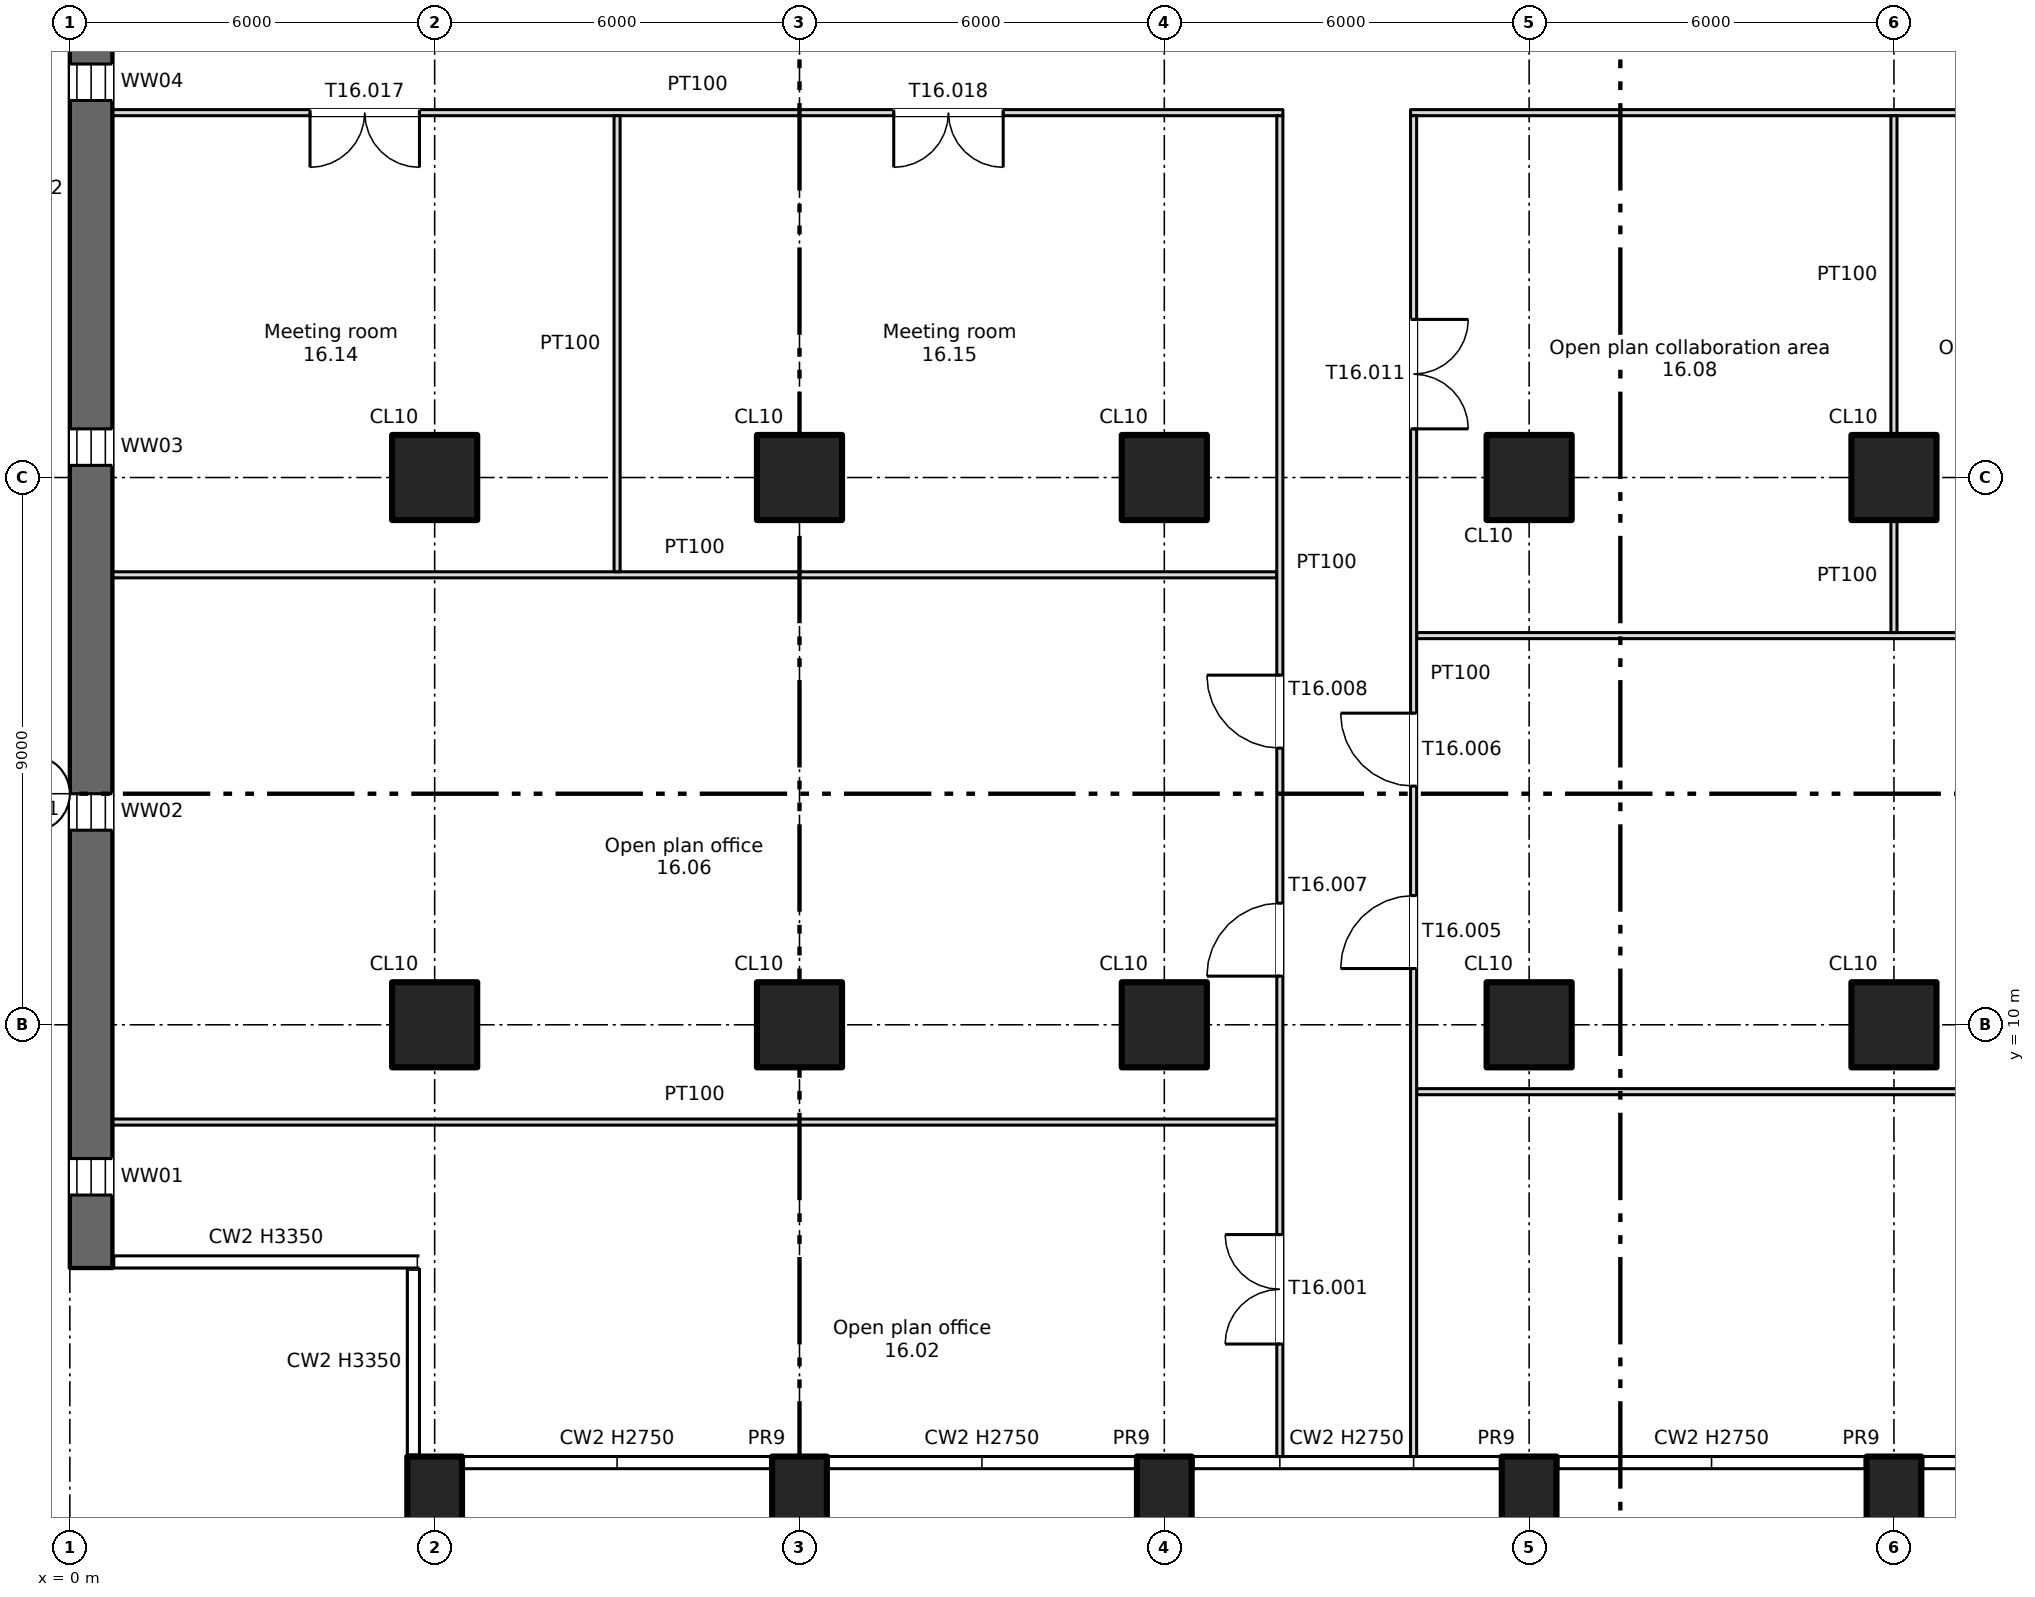
"""IFC4 building model, lengths in metres.
Left out: names, types, materials, properties, quantities, classifications, styles, units other than length and angle.
Written with IfcOpenShell. Run it as: python <this file> out.ifc"""

import sys

from ifc_helpers import new_model, si_unit, direction, frame, frame_2d, origin, origin_2d, place, context, subcontext, project, spatial, rectangle, extrude, element, fill, save


model = new_model("IFC4")
c1 = context("Model", 3, precision=1e-05, world=origin(), true_north=direction((0.0, 1.0)))
c2 = subcontext(c1, "Body", "Model", "MODEL_VIEW")
j1 = project(units=[si_unit("LENGTHUNIT", "METRE"), si_unit("PLANEANGLEUNIT", "RADIAN")], contexts=[c1])
p1 = place(None, origin())
s1 = spatial("IfcSite", under=j1, at=p1, CompositionType="ELEMENT")
p2 = place(p1, origin())
s2 = spatial("IfcBuilding", under=s1, at=p2, CompositionType="ELEMENT")
p3 = place(p2, frame((0.0, 0.0, 102.5)))
s3 = spatial("IfcBuildingStorey", under=s2, at=p3, CompositionType="ELEMENT", Elevation=102.5)
for number, where, z_axis, x_axis in (
    (1, (6.0, 2.2, -0.4), (0.0, 0.0, 1.0), (1.0, 0.0, 0.0)),
    (2, (12.0, 2.2, -0.4), (0.0, 0.0, 1.0), (1.0, 0.0, 0.0)),
    (3, (18.0, 2.2, -0.4), (0.0, 0.0, 1.0), (1.0, 0.0, 0.0)),
    (4, (24.0, 2.2, -0.4), (0.0, 0.0, 1.0), (1.0, 0.0, 0.0)),
    (5, (30.0, 2.2, -0.4), (0.0, 0.0, 1.0), (1.0, 0.0, 0.0)),
):
    element("IfcColumn", number, at=place(p3, frame(where, z_axis=z_axis, x_axis=x_axis)), inside=s3, PredefinedType="COLUMN", context=c2, shape_type="SweptSolid", body=[
        extrude(rectangle(XDim=0.9, YDim=1.4, at=origin_2d()), origin(), (0.0, 0.0, 1.0), 3.75),
    ])
for number, where, z_axis, x_axis in (
    (6, (6.0, 10.0, 0.0), (0.0, 0.0, 1.0), (1.0, 0.0, 0.0)),
    (7, (6.0, 19.0, 0.0), (0.0, 0.0, 1.0), (1.0, 0.0, 0.0)),
    (8, (12.0, 10.0, 0.0), (0.0, 0.0, 1.0), (1.0, 0.0, 0.0)),
    (9, (12.0, 19.0, 0.0), (0.0, 0.0, 1.0), (1.0, 0.0, 0.0)),
    (10, (18.0, 10.0, 0.0), (0.0, 0.0, 1.0), (1.0, 0.0, 0.0)),
    (11, (18.0, 19.0, 0.0), (0.0, 0.0, 1.0), (1.0, 0.0, 0.0)),
    (12, (24.0, 10.0, 0.0), (0.0, 0.0, 1.0), (1.0, 0.0, 0.0)),
    (13, (24.0, 19.0, 0.0), (0.0, 0.0, 1.0), (1.0, 0.0, 0.0)),
    (14, (30.0, 10.0, 0.0), (0.0, 0.0, 1.0), (1.0, 0.0, 0.0)),
    (15, (30.0, 19.0, 0.0), (0.0, 0.0, 1.0), (1.0, 0.0, 0.0)),
):
    element("IfcColumn", number, at=place(p3, frame(where, z_axis=z_axis, x_axis=x_axis)), inside=s3, PredefinedType="COLUMN", context=c2, shape_type="SweptSolid", body=[
        extrude(rectangle(XDim=1.4, YDim=1.4, at=origin_2d()), origin(), (0.0, 0.0, 1.0), 3.35),
    ])
p4 = place(p3, frame((0.35, 6.0, 0.0), z_axis=(0.0, 0.0, 1.0), x_axis=(0.0, 1.0, 0.0)))
e16 = element("IfcWall", 16, at=p4, inside=s3, PredefinedType="SHEAR", context=c2, shape_type="SweptSolid", body=[
    extrude(rectangle(XDim=35.5, YDim=0.7, at=frame_2d((17.75, 0.0))), origin(), (0.0, 0.0, 1.0), 3.35),
])
p5 = place(p4, frame((1.2, 0.0, 0.6)))
e17 = element("IfcOpeningElement", 17, at=p5, cuts=e16, PredefinedType="OPENING", context=c2, shape_type="SweptSolid", body=[
    extrude(rectangle(XDim=0.6, YDim=2.4, at=frame_2d((0.3, 1.2))), frame((0.0, 0.36, 0.0), z_axis=(0.0, -1.0, 0.0), x_axis=(1.0, 0.0, 0.0)), (0.0, 0.0, 1.0), 0.72),
])
p6 = place(p4, frame((7.2, 0.0, 0.6)))
e18 = element("IfcOpeningElement", 18, at=p6, cuts=e16, PredefinedType="OPENING", context=c2, shape_type="SweptSolid", body=[
    extrude(rectangle(XDim=0.6, YDim=2.4, at=frame_2d((0.3, 1.2))), frame((0.0, 0.36, 0.0), z_axis=(0.0, -1.0, 0.0), x_axis=(1.0, 0.0, 0.0)), (0.0, 0.0, 1.0), 0.72),
])
p7 = place(p4, frame((13.2, 0.0, 0.6)))
e19 = element("IfcOpeningElement", 19, at=p7, cuts=e16, PredefinedType="OPENING", context=c2, shape_type="SweptSolid", body=[
    extrude(rectangle(XDim=0.6, YDim=2.4, at=frame_2d((0.3, 1.2))), frame((0.0, 0.36, 0.0), z_axis=(0.0, -1.0, 0.0), x_axis=(1.0, 0.0, 0.0)), (0.0, 0.0, 1.0), 0.72),
])
p8 = place(p4, frame((19.2, 0.0, 0.6)))
e20 = element("IfcOpeningElement", 20, at=p8, cuts=e16, PredefinedType="OPENING", context=c2, shape_type="SweptSolid", body=[
    extrude(rectangle(XDim=0.6, YDim=2.4, at=frame_2d((0.3, 1.2))), frame((0.0, 0.36, 0.0), z_axis=(0.0, -1.0, 0.0), x_axis=(1.0, 0.0, 0.0)), (0.0, 0.0, 1.0), 0.72),
])
p9 = place(p4, frame((25.2, 0.0, 0.6)))
e21 = element("IfcOpeningElement", 21, at=p9, cuts=e16, PredefinedType="OPENING", context=c2, shape_type="SweptSolid", body=[
    extrude(rectangle(XDim=0.6, YDim=2.4, at=frame_2d((0.3, 1.2))), frame((0.0, 0.36, 0.0), z_axis=(0.0, -1.0, 0.0), x_axis=(1.0, 0.0, 0.0)), (0.0, 0.0, 1.0), 0.72),
])
p10 = place(p4, frame((31.2, 0.0, 0.6)))
e22 = element("IfcOpeningElement", 22, at=p10, cuts=e16, PredefinedType="OPENING", context=c2, shape_type="SweptSolid", body=[
    extrude(rectangle(XDim=0.6, YDim=2.4, at=frame_2d((0.3, 1.2))), frame((0.0, 0.36, 0.0), z_axis=(0.0, -1.0, 0.0), x_axis=(1.0, 0.0, 0.0)), (0.0, 0.0, 1.0), 0.72),
])
p11 = place(p3, frame((0.7, 8.4, 0.0), z_axis=(0.0, 0.0, 1.0), x_axis=(1.0, 0.0, 0.0)))
e23 = element("IfcWall", 23, at=p11, inside=s3, PredefinedType="PARTITIONING", context=c2, shape_type="SweptSolid", body=[
    extrude(rectangle(XDim=19.15, YDim=0.1, at=frame_2d((9.575, 0.0))), origin(), (0.0, 0.0, 1.0), 3.35),
])
for number, where, z_axis, x_axis in (
    (24, (22.15, 8.9, 0.0), (0.0, 0.0, 1.0), (1.0, 0.0, 0.0)),
    (25, (22.15, 16.4, 0.0), (0.0, 0.0, 1.0), (1.0, 0.0, 0.0)),
):
    element("IfcWall", number, at=place(p3, frame(where, z_axis=z_axis, x_axis=x_axis)), inside=s3, PredefinedType="PARTITIONING", context=c2, shape_type="SweptSolid", body=[
        extrude(rectangle(XDim=21.7, YDim=0.1, at=frame_2d((10.85, 0.0))), origin(), (0.0, 0.0, 1.0), 3.35),
    ])
p12 = place(p3, frame((0.7, 17.4, 0.0), z_axis=(0.0, 0.0, 1.0), x_axis=(1.0, 0.0, 0.0)))
e26 = element("IfcWall", 26, at=p12, inside=s3, PredefinedType="PARTITIONING", context=c2, shape_type="SweptSolid", body=[
    extrude(rectangle(XDim=19.15, YDim=0.1, at=frame_2d((9.575, 0.0))), origin(), (0.0, 0.0, 1.0), 3.35),
])
p13 = place(p3, frame((0.7, 25.0, 0.0), z_axis=(0.0, 0.0, 1.0), x_axis=(1.0, 0.0, 0.0)))
e27 = element("IfcWall", 27, at=p13, inside=s3, PredefinedType="PARTITIONING", context=c2, shape_type="SweptSolid", body=[
    extrude(rectangle(XDim=19.25, YDim=0.1, at=frame_2d((9.625, 0.0))), origin(), (0.0, 0.0, 1.0), 3.35),
])
p14 = place(p13, frame((3.25, 0.0, 0.0)))
e28 = element("IfcOpeningElement", 28, at=p14, cuts=e27, PredefinedType="OPENING", context=c2, shape_type="SweptSolid", body=[
    extrude(rectangle(XDim=1.8, YDim=2.1, at=frame_2d((0.9, 1.05))), frame((0.0, 0.06, 0.0), z_axis=(0.0, -1.0, 0.0), x_axis=(1.0, 0.0, 0.0)), (0.0, 0.0, 1.0), 0.12),
])
p15 = place(p13, frame((12.85, 0.0, 0.0)))
e29 = element("IfcOpeningElement", 29, at=p15, cuts=e27, PredefinedType="OPENING", context=c2, shape_type="SweptSolid", body=[
    extrude(rectangle(XDim=1.8, YDim=2.1, at=frame_2d((0.9, 1.05))), frame((0.0, 0.06, 0.0), z_axis=(0.0, -1.0, 0.0), x_axis=(1.0, 0.0, 0.0)), (0.0, 0.0, 1.0), 0.12),
])
p16 = place(p3, frame((22.05, 25.0, 0.0), z_axis=(0.0, 0.0, 1.0), x_axis=(1.0, 0.0, 0.0)))
e30 = element("IfcWall", 30, at=p16, inside=s3, PredefinedType="PARTITIONING", context=c2, shape_type="SweptSolid", body=[
    extrude(rectangle(XDim=21.9, YDim=0.1, at=frame_2d((10.95, 0.0))), origin(), (0.0, 0.0, 1.0), 3.35),
])
p17 = place(p16, frame((10.45, 0.0, 0.0)))
e31 = element("IfcOpeningElement", 31, at=p17, cuts=e30, PredefinedType="OPENING", context=c2, shape_type="SweptSolid", body=[
    extrude(rectangle(XDim=1.0, YDim=2.1, at=frame_2d((0.5, 1.05))), frame((0.0, 0.06, 0.0), z_axis=(0.0, -1.0, 0.0), x_axis=(1.0, 0.0, 0.0)), (0.0, 0.0, 1.0), 0.12),
])
p18 = place(p3, frame((9.0, 17.45, 0.0), z_axis=(0.0, 0.0, 1.0), x_axis=(0.0, 1.0, 0.0)))
e32 = element("IfcWall", 32, at=p18, inside=s3, PredefinedType="PARTITIONING", context=c2, shape_type="SweptSolid", body=[
    extrude(rectangle(XDim=7.5, YDim=0.1, at=frame_2d((3.75, 0.0))), origin(), (0.0, 0.0, 1.0), 3.35),
])
p19 = place(p3, frame((19.9, 2.9, 0.0), z_axis=(0.0, 0.0, 1.0), x_axis=(0.0, 1.0, 0.0)))
e33 = element("IfcWall", 33, at=p19, inside=s3, PredefinedType="PARTITIONING", context=c2, shape_type="SweptSolid", body=[
    extrude(rectangle(XDim=22.05, YDim=0.1, at=frame_2d((11.025, 0.0))), origin(), (0.0, 0.0, 1.0), 3.35),
])
p20 = place(p19, frame((1.85, 0.0, 0.0)))
e34 = element("IfcOpeningElement", 34, at=p20, cuts=e33, PredefinedType="OPENING", context=c2, shape_type="SweptSolid", body=[
    extrude(rectangle(XDim=1.8, YDim=2.1, at=frame_2d((0.9, 1.05))), frame((0.0, 0.06, 0.0), z_axis=(0.0, -1.0, 0.0), x_axis=(1.0, 0.0, 0.0)), (0.0, 0.0, 1.0), 0.12),
])
p21 = place(p19, frame((7.9, 0.0, 0.0)))
e35 = element("IfcOpeningElement", 35, at=p21, cuts=e33, PredefinedType="OPENING", context=c2, shape_type="SweptSolid", body=[
    extrude(rectangle(XDim=1.2, YDim=2.1, at=frame_2d((0.6, 1.05))), frame((0.0, 0.06, 0.0), z_axis=(0.0, -1.0, 0.0), x_axis=(1.0, 0.0, 0.0)), (0.0, 0.0, 1.0), 0.12),
])
p22 = place(p19, frame((11.65, 0.0, 0.0)))
e36 = element("IfcOpeningElement", 36, at=p22, cuts=e33, PredefinedType="OPENING", context=c2, shape_type="SweptSolid", body=[
    extrude(rectangle(XDim=1.2, YDim=2.1, at=frame_2d((0.6, 1.05))), frame((0.0, 0.06, 0.0), z_axis=(0.0, -1.0, 0.0), x_axis=(1.0, 0.0, 0.0)), (0.0, 0.0, 1.0), 0.12),
])
p23 = place(p3, frame((22.1, 2.9, 0.0), z_axis=(0.0, 0.0, 1.0), x_axis=(0.0, 1.0, 0.0)))
e37 = element("IfcWall", 37, at=p23, inside=s3, PredefinedType="PARTITIONING", context=c2, shape_type="SweptSolid", body=[
    extrude(rectangle(XDim=22.05, YDim=0.1, at=frame_2d((11.025, 0.0))), origin(), (0.0, 0.0, 1.0), 3.35),
])
p24 = place(p23, frame((8.025, 0.0, 0.0)))
e38 = element("IfcOpeningElement", 38, at=p24, cuts=e37, PredefinedType="OPENING", context=c2, shape_type="SweptSolid", body=[
    extrude(rectangle(XDim=1.2, YDim=2.1, at=frame_2d((0.6, 1.05))), frame((0.0, 0.06, 0.0), z_axis=(0.0, -1.0, 0.0), x_axis=(1.0, 0.0, 0.0)), (0.0, 0.0, 1.0), 0.12),
])
p25 = place(p23, frame((11.025, 0.0, 0.0)))
e39 = element("IfcOpeningElement", 39, at=p25, cuts=e37, PredefinedType="OPENING", context=c2, shape_type="SweptSolid", body=[
    extrude(rectangle(XDim=1.2, YDim=2.1, at=frame_2d((0.6, 1.05))), frame((0.0, 0.06, 0.0), z_axis=(0.0, -1.0, 0.0), x_axis=(1.0, 0.0, 0.0)), (0.0, 0.0, 1.0), 0.12),
])
p26 = place(p23, frame((16.9, 0.0, 0.0)))
e40 = element("IfcOpeningElement", 40, at=p26, cuts=e37, PredefinedType="OPENING", context=c2, shape_type="SweptSolid", body=[
    extrude(rectangle(XDim=1.8, YDim=2.1, at=frame_2d((0.9, 1.05))), frame((0.0, 0.06, 0.0), z_axis=(0.0, -1.0, 0.0), x_axis=(1.0, 0.0, 0.0)), (0.0, 0.0, 1.0), 0.12),
])
p27 = place(p3, frame((30.0, 16.45, 0.0), z_axis=(0.0, 0.0, 1.0), x_axis=(0.0, 1.0, 0.0)))
e41 = element("IfcWall", 41, at=p27, inside=s3, PredefinedType="PARTITIONING", context=c2, shape_type="SweptSolid", body=[
    extrude(rectangle(XDim=1.85, YDim=0.1, at=frame_2d((0.925, 0.0))), origin(), (0.0, 0.0, 1.0), 3.35),
])
p28 = place(p3, frame((30.0, 19.7, 0.0), z_axis=(0.0, 0.0, 1.0), x_axis=(0.0, 1.0, 0.0)))
e42 = element("IfcWall", 42, at=p28, inside=s3, PredefinedType="PARTITIONING", context=c2, shape_type="SweptSolid", body=[
    extrude(rectangle(XDim=5.25, YDim=0.1, at=frame_2d((2.625, 0.0))), origin(), (0.0, 0.0, 1.0), 3.35),
])
p29 = place(p5, origin())
e43 = element("IfcWindow", 43, at=p29, inside=s3, PartitioningType="SINGLE_PANEL", PredefinedType="WINDOW", context=c2, shape_type="SweptSolid", body=[
    extrude(rectangle(XDim=0.6, YDim=2.4, at=frame_2d((0.3, 1.2))), frame((0.0, 0.03, 0.0), z_axis=(0.0, -1.0, 0.0), x_axis=(1.0, 0.0, 0.0)), (0.0, 0.0, 1.0), 0.06),
])
fill(e17, e43)
p30 = place(p6, origin())
e44 = element("IfcWindow", 44, at=p30, inside=s3, PartitioningType="SINGLE_PANEL", PredefinedType="WINDOW", context=c2, shape_type="SweptSolid", body=[
    extrude(rectangle(XDim=0.6, YDim=2.4, at=frame_2d((0.3, 1.2))), frame((0.0, 0.03, 0.0), z_axis=(0.0, -1.0, 0.0), x_axis=(1.0, 0.0, 0.0)), (0.0, 0.0, 1.0), 0.06),
])
fill(e18, e44)
p31 = place(p7, origin())
e45 = element("IfcWindow", 45, at=p31, inside=s3, PartitioningType="SINGLE_PANEL", PredefinedType="WINDOW", context=c2, shape_type="SweptSolid", body=[
    extrude(rectangle(XDim=0.6, YDim=2.4, at=frame_2d((0.3, 1.2))), frame((0.0, 0.03, 0.0), z_axis=(0.0, -1.0, 0.0), x_axis=(1.0, 0.0, 0.0)), (0.0, 0.0, 1.0), 0.06),
])
fill(e19, e45)
p32 = place(p8, origin())
e46 = element("IfcWindow", 46, at=p32, inside=s3, PartitioningType="SINGLE_PANEL", PredefinedType="WINDOW", context=c2, shape_type="SweptSolid", body=[
    extrude(rectangle(XDim=0.6, YDim=2.4, at=frame_2d((0.3, 1.2))), frame((0.0, 0.03, 0.0), z_axis=(0.0, -1.0, 0.0), x_axis=(1.0, 0.0, 0.0)), (0.0, 0.0, 1.0), 0.06),
])
fill(e20, e46)
p33 = place(p20, origin())
e47 = element("IfcDoor", 47, at=p33, inside=s3, OperationType="DOUBLE_DOOR_SINGLE_SWING", PredefinedType="DOOR", context=c2, shape_type="SweptSolid", body=[
    extrude(rectangle(XDim=1.8, YDim=2.1, at=frame_2d((0.9, 1.05))), frame((0.0, 0.025, 0.0), z_axis=(0.0, -1.0, 0.0), x_axis=(1.0, 0.0, 0.0)), (0.0, 0.0, 1.0), 0.05),
])
fill(e34, e47)
p34 = place(p24, origin())
e48 = element("IfcDoor", 48, at=p34, inside=s3, OperationType="SINGLE_SWING_LEFT", PredefinedType="DOOR", context=c2, shape_type="SweptSolid", body=[
    extrude(rectangle(XDim=1.2, YDim=2.1, at=frame_2d((0.6, 1.05))), frame((0.0, 0.025, 0.0), z_axis=(0.0, -1.0, 0.0), x_axis=(1.0, 0.0, 0.0)), (0.0, 0.0, 1.0), 0.05),
])
fill(e38, e48)
p35 = place(p25, origin())
e49 = element("IfcDoor", 49, at=p35, inside=s3, OperationType="SINGLE_SWING_RIGHT", PredefinedType="DOOR", context=c2, shape_type="SweptSolid", body=[
    extrude(rectangle(XDim=1.2, YDim=2.1, at=frame_2d((0.6, 1.05))), frame((0.0, 0.025, 0.0), z_axis=(0.0, -1.0, 0.0), x_axis=(1.0, 0.0, 0.0)), (0.0, 0.0, 1.0), 0.05),
])
fill(e39, e49)
p36 = place(p21, origin())
e50 = element("IfcDoor", 50, at=p36, inside=s3, OperationType="SINGLE_SWING_LEFT", PredefinedType="DOOR", context=c2, shape_type="SweptSolid", body=[
    extrude(rectangle(XDim=1.2, YDim=2.1, at=frame_2d((0.6, 1.05))), frame((0.0, 0.025, 0.0), z_axis=(0.0, -1.0, 0.0), x_axis=(1.0, 0.0, 0.0)), (0.0, 0.0, 1.0), 0.05),
])
fill(e35, e50)
p37 = place(p22, origin())
e51 = element("IfcDoor", 51, at=p37, inside=s3, OperationType="SINGLE_SWING_RIGHT", PredefinedType="DOOR", context=c2, shape_type="SweptSolid", body=[
    extrude(rectangle(XDim=1.2, YDim=2.1, at=frame_2d((0.6, 1.05))), frame((0.0, 0.025, 0.0), z_axis=(0.0, -1.0, 0.0), x_axis=(1.0, 0.0, 0.0)), (0.0, 0.0, 1.0), 0.05),
])
fill(e36, e51)
p38 = place(p26, origin())
e52 = element("IfcDoor", 52, at=p38, inside=s3, OperationType="DOUBLE_DOOR_SINGLE_SWING", PredefinedType="DOOR", context=c2, shape_type="SweptSolid", body=[
    extrude(rectangle(XDim=1.8, YDim=2.1, at=frame_2d((0.9, 1.05))), frame((0.0, 0.025, 0.0), z_axis=(0.0, -1.0, 0.0), x_axis=(1.0, 0.0, 0.0)), (0.0, 0.0, 1.0), 0.05),
])
fill(e40, e52)
p39 = place(p14, origin())
e53 = element("IfcDoor", 53, at=p39, inside=s3, OperationType="DOUBLE_DOOR_SINGLE_SWING", PredefinedType="DOOR", context=c2, shape_type="SweptSolid", body=[
    extrude(rectangle(XDim=1.8, YDim=2.1, at=frame_2d((0.9, 1.05))), frame((0.0, 0.025, 0.0), z_axis=(0.0, -1.0, 0.0), x_axis=(1.0, 0.0, 0.0)), (0.0, 0.0, 1.0), 0.05),
])
fill(e28, e53)
p40 = place(p15, origin())
e54 = element("IfcDoor", 54, at=p40, inside=s3, OperationType="DOUBLE_DOOR_SINGLE_SWING", PredefinedType="DOOR", context=c2, shape_type="SweptSolid", body=[
    extrude(rectangle(XDim=1.8, YDim=2.1, at=frame_2d((0.9, 1.05))), frame((0.0, 0.025, 0.0), z_axis=(0.0, -1.0, 0.0), x_axis=(1.0, 0.0, 0.0)), (0.0, 0.0, 1.0), 0.05),
])
fill(e29, e54)
save(model, sys.argv[1])
